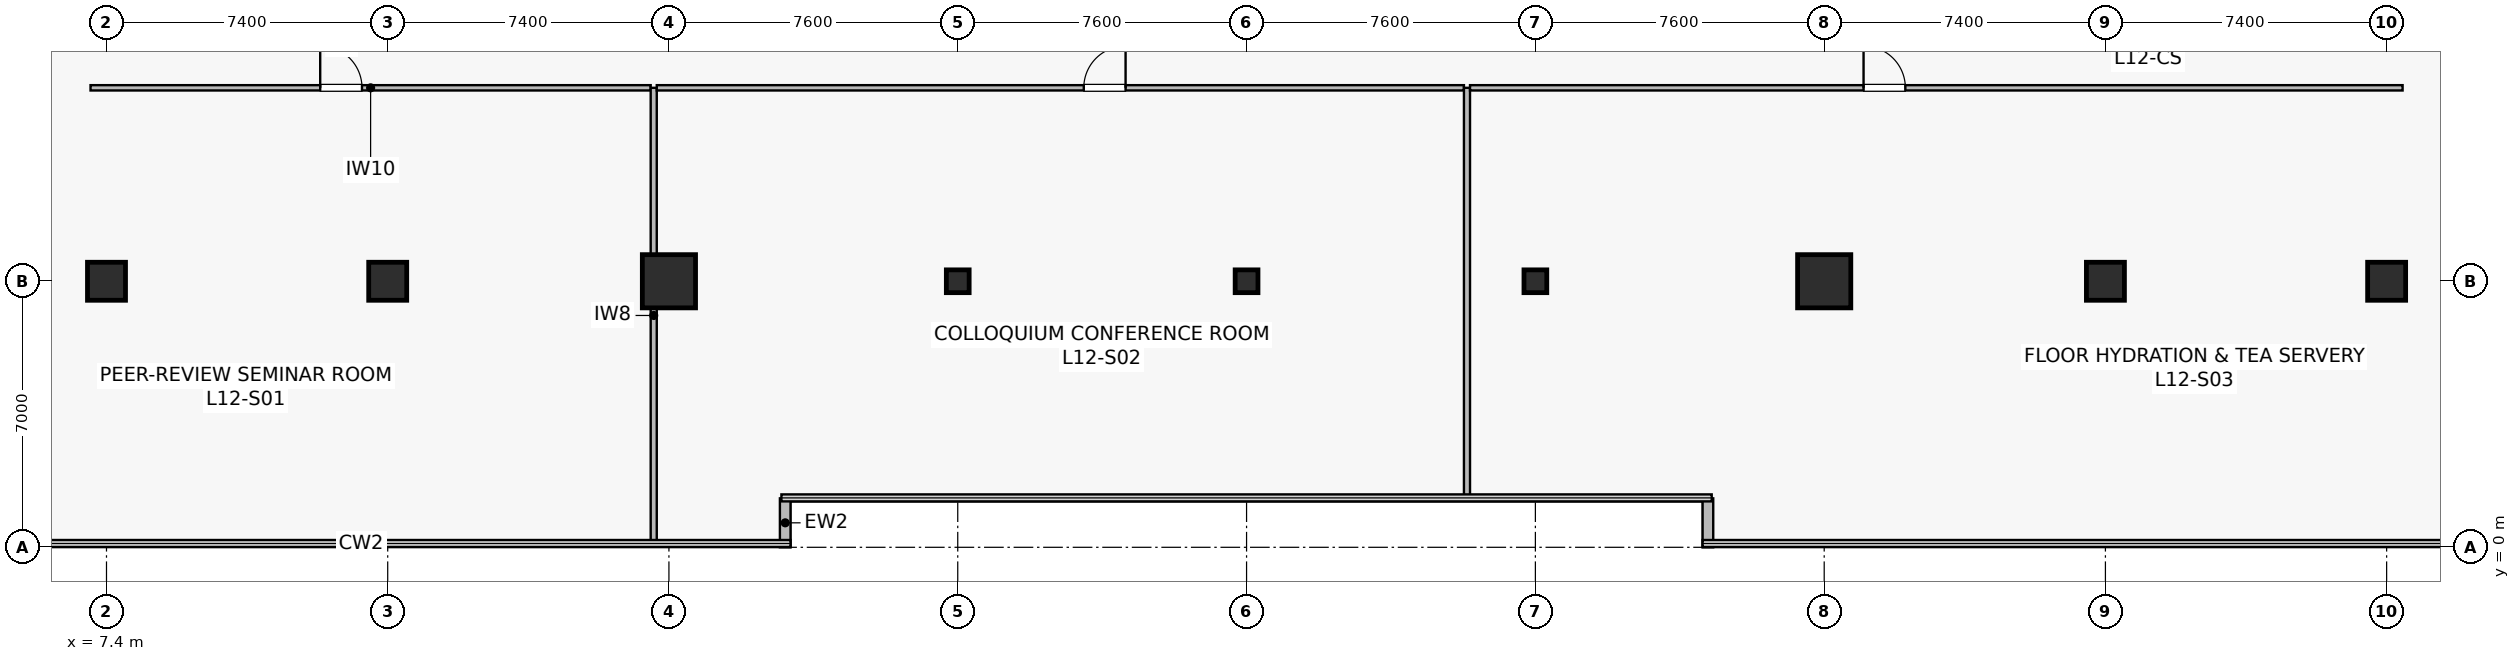
"""IFC4 building model, lengths in metres.
Left out: names, types, materials, properties, quantities, classifications, styles, units other than length and angle.
Written with IfcOpenShell. Run it as: python <this file> out.ifc"""

import sys

from ifc_helpers import new_model, si_unit, direction, frame, frame_2d, origin, origin_2d, place, context, subcontext, project, spatial, rectangle, hollow_rectangle, extrude, source, transform, mapped, element, fill, save


model = new_model("IFC4")
c1 = context("Model", 3, precision=1e-05, world=origin(), true_north=direction((0.0, 1.0)))
c2 = subcontext(c1, "Body", "Model", "MODEL_VIEW")
j1 = project(units=[si_unit("LENGTHUNIT", "METRE"), si_unit("PLANEANGLEUNIT", "RADIAN")], contexts=[c1])
p1 = place(None, origin())
s1 = spatial("IfcSite", under=j1, at=p1, CompositionType="ELEMENT")
p2 = place(p1, origin())
s2 = spatial("IfcBuilding", under=s1, at=p2, CompositionType="ELEMENT")
p3 = place(p2, frame((0.0, 0.0, 49.8)))
s3 = spatial("IfcBuildingStorey", under=s2, at=p3, CompositionType="ELEMENT", Elevation=49.8)
m1 = source(origin(), c2, "Body", "SweptSolid", [
    extrude(rectangle(XDim=1.0, YDim=1.0, at=origin_2d()), origin(), (0.0, 0.0, 1.0), 4.1),
])
p4 = place(p3, frame((14.8, 7.0, 0.0), z_axis=(0.0, 0.0, 1.0), x_axis=(1.0, 0.0, 0.0)))
e1 = element("IfcColumn", 1, at=p4, inside=s3, PredefinedType="COLUMN", context=c2, shape_type="MappedRepresentation", body=[
    mapped(m1, transform((0.0, 0.0, 0.0), scale=1.0)),
])
m2 = source(origin(), c2, "Body", "SweptSolid", [
    extrude(rectangle(XDim=1.4, YDim=1.4, at=origin_2d()), origin(), (0.0, 0.0, 1.0), 4.1),
])
for number, where, z_axis, x_axis in (
    (2, (22.2, 7.0, 0.0), (0.0, 0.0, 1.0), (1.0, 0.0, 0.0)),
    (3, (52.6, 7.0, 0.0), (0.0, 0.0, 1.0), (1.0, 0.0, 0.0)),
):
    element("IfcColumn", number, at=place(p3, frame(where, z_axis=z_axis, x_axis=x_axis)), inside=s3, PredefinedType="COLUMN", context=c2, shape_type="MappedRepresentation", body=[
        mapped(m2, transform((0.0, 0.0, 0.0), scale=1.0)),
    ])
for number, where, z_axis, x_axis in (
    (4, (60.0, 7.0, 0.0), (0.0, 0.0, 1.0), (1.0, 0.0, 0.0)),
    (5, (7.4, 7.0, 0.0), (0.0, 0.0, 1.0), (1.0, 0.0, 0.0)),
    (6, (67.4, 7.0, 0.0), (0.0, 0.0, 1.0), (1.0, 0.0, 0.0)),
):
    element("IfcColumn", number, at=place(p3, frame(where, z_axis=z_axis, x_axis=x_axis)), inside=s3, PredefinedType="COLUMN", context=c2, shape_type="MappedRepresentation", body=[
        mapped(m1, transform((0.0, 0.0, 0.0), scale=1.0)),
    ])
m3 = source(origin(), c2, "Body", "SweptSolid", [
    extrude(hollow_rectangle(XDim=0.6, YDim=0.6, WallThickness=0.028, at=origin_2d()), origin(), (0.0, 0.0, 1.0), 4.1),
])
for number, where, z_axis, x_axis in (
    (7, (29.8, 7.0, 0.0), (0.0, 0.0, 1.0), (1.0, 0.0, 0.0)),
    (8, (37.4, 7.0, 0.0), (0.0, 0.0, 1.0), (1.0, 0.0, 0.0)),
    (9, (45.0, 7.0, 0.0), (0.0, 0.0, 1.0), (1.0, 0.0, 0.0)),
):
    element("IfcColumn", number, at=place(p3, frame(where, z_axis=z_axis, x_axis=x_axis)), inside=s3, PredefinedType="COLUMN", context=c2, shape_type="MappedRepresentation", body=[
        mapped(m3, transform((0.0, 0.0, 0.0), scale=1.0)),
    ])
for number, where, z_axis, x_axis in (
    (10, (25.26, 0.0, 0.0), (0.0, 0.0, 1.0), (0.0, 1.0, 0.0)),
    (11, (49.54, 1.288, 0.0), (0.0, 0.0, 1.0), (0.0, -1.0, 0.0)),
):
    element("IfcWall", number, at=place(p3, frame(where, z_axis=z_axis, x_axis=x_axis)), inside=s3, PredefinedType="STANDARD", context=c2, shape_type="SweptSolid", body=[
        extrude(rectangle(XDim=1.288, YDim=0.28, at=frame_2d((0.644, 0.0))), origin(), (0.0, 0.0, 1.0), 3.78),
    ])
p5 = place(p3, frame((6.98, 12.09, 0.0), z_axis=(0.0, 0.0, 1.0), x_axis=(1.0, 0.0, 0.0)))
e12 = element("IfcWall", 12, at=p5, inside=s3, PredefinedType="PARTITIONING", context=c2, shape_type="SweptSolid", body=[
    extrude(rectangle(XDim=14.74, YDim=0.14, at=frame_2d((7.37, 0.0))), origin(), (0.0, 0.0, 1.0), 3.065),
])
p6 = place(p5, frame((6.044, 0.0, 0.0)))
e13 = element("IfcOpeningElement", 13, at=p6, cuts=e12, PredefinedType="OPENING", context=c2, shape_type="SweptSolid", body=[
    extrude(rectangle(XDim=1.1, YDim=2.18, at=frame_2d((0.55, 1.09))), frame((0.0, 0.08, 0.0), z_axis=(0.0, -1.0, 0.0), x_axis=(1.0, 0.0, 0.0)), (0.0, 0.0, 1.0), 0.16),
])
p7 = place(p3, frame((21.8, 0.11, 0.0), z_axis=(0.0, 0.0, 1.0), x_axis=(0.0, 1.0, 0.0)))
e14 = element("IfcWall", 14, at=p7, inside=s3, PredefinedType="PARTITIONING", context=c2, shape_type="SweptSolid", body=[
    extrude(rectangle(XDim=11.98, YDim=0.16, at=frame_2d((5.99, 0.0))), origin(), (0.0, 0.0, 1.0), 3.015),
])
p8 = place(p3, frame((21.88, 12.09, 0.0), z_axis=(0.0, 0.0, 1.0), x_axis=(1.0, 0.0, 0.0)))
e15 = element("IfcWall", 15, at=p8, inside=s3, PredefinedType="PARTITIONING", context=c2, shape_type="SweptSolid", body=[
    extrude(rectangle(XDim=21.24, YDim=0.14, at=frame_2d((10.62, 0.0))), origin(), (0.0, 0.0, 1.0), 3.065),
])
p9 = place(p8, frame((11.236, 0.0, 0.0)))
e16 = element("IfcOpeningElement", 16, at=p9, cuts=e15, PredefinedType="OPENING", context=c2, shape_type="SweptSolid", body=[
    extrude(rectangle(XDim=1.1, YDim=2.18, at=frame_2d((0.55, 1.09))), frame((0.0, 0.08, 0.0), z_axis=(0.0, -1.0, 0.0), x_axis=(1.0, 0.0, 0.0)), (0.0, 0.0, 1.0), 0.16),
])
p10 = place(p3, frame((43.2, 1.31, 0.0), z_axis=(0.0, 0.0, 1.0), x_axis=(0.0, 1.0, 0.0)))
e17 = element("IfcWall", 17, at=p10, inside=s3, PredefinedType="PARTITIONING", context=c2, shape_type="SweptSolid", body=[
    extrude(rectangle(XDim=10.78, YDim=0.16, at=frame_2d((5.39, 0.0))), origin(), (0.0, 0.0, 1.0), 3.015),
])
p11 = place(p3, frame((43.28, 12.09, 0.0), z_axis=(0.0, 0.0, 1.0), x_axis=(1.0, 0.0, 0.0)))
e18 = element("IfcWall", 18, at=p11, inside=s3, PredefinedType="PARTITIONING", context=c2, shape_type="SweptSolid", body=[
    extrude(rectangle(XDim=24.54, YDim=0.14, at=frame_2d((12.27, 0.0))), origin(), (0.0, 0.0, 1.0), 3.065),
])
p12 = place(p11, frame((10.356, 0.0, 0.0)))
e19 = element("IfcOpeningElement", 19, at=p12, cuts=e18, PredefinedType="OPENING", context=c2, shape_type="SweptSolid", body=[
    extrude(rectangle(XDim=1.1, YDim=2.18, at=frame_2d((0.55, 1.09))), frame((0.0, 0.08, 0.0), z_axis=(0.0, -1.0, 0.0), x_axis=(1.0, 0.0, 0.0)), (0.0, 0.0, 1.0), 0.16),
])
m4 = source(origin(), c2, "Body", "SweptSolid", [
    extrude(rectangle(XDim=1.1, YDim=2.18, at=frame_2d((0.55, 1.09))), frame((0.0, 0.025, 0.0), z_axis=(0.0, -1.0, 0.0), x_axis=(1.0, 0.0, 0.0)), (0.0, 0.0, 1.0), 0.05),
])
p13 = place(p6, origin())
e20 = element("IfcDoor", 20, at=p13, inside=s3, OperationType="SINGLE_SWING_LEFT", PredefinedType="DOOR", context=c2, shape_type="MappedRepresentation", body=[
    mapped(m4, transform((0.0, 0.0, 0.0), scale=1.0)),
])
fill(e13, e20)
p14 = place(p9, origin())
e21 = element("IfcDoor", 21, at=p14, inside=s3, OperationType="SINGLE_SWING_RIGHT", PredefinedType="DOOR", context=c2, shape_type="MappedRepresentation", body=[
    mapped(m4, transform((0.0, 0.0, 0.0), scale=1.0)),
])
fill(e16, e21)
p15 = place(p12, origin())
e22 = element("IfcDoor", 22, at=p15, inside=s3, OperationType="SINGLE_SWING_LEFT", PredefinedType="DOOR", context=c2, shape_type="MappedRepresentation", body=[
    mapped(m4, transform((0.0, 0.0, 0.0), scale=1.0)),
])
fill(e19, e22)
save(model, sys.argv[1])
